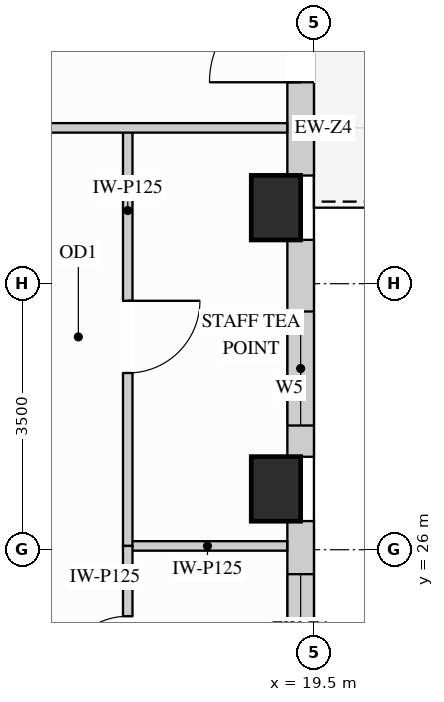
"""IFC4 building model, lengths in metres.
Left out: names, types, materials, properties, quantities, classifications, styles, units other than length and angle.
Written with IfcOpenShell. Run it as: python <this file> out.ifc"""

import sys

from ifc_helpers import new_model, si_unit, direction, frame, frame_2d, origin, origin_2d, place, context, subcontext, project, spatial, rectangle, extrude, source, transform, mapped, element, fill, save


model = new_model("IFC4")
c1 = context("Model", 3, precision=1e-05, world=origin(), true_north=direction((0.0, 1.0)))
c2 = subcontext(c1, "Body", "Model", "MODEL_VIEW")
j1 = project(units=[si_unit("LENGTHUNIT", "METRE"), si_unit("PLANEANGLEUNIT", "RADIAN")], contexts=[c1])
p1 = place(None, origin())
s1 = spatial("IfcSite", under=j1, at=p1, CompositionType="ELEMENT")
p2 = place(p1, origin())
s2 = spatial("IfcBuilding", under=s1, at=p2, CompositionType="ELEMENT")
p3 = place(p2, frame((0.0, 0.0, 223.2)))
s3 = spatial("IfcBuildingStorey", under=s2, at=p3, CompositionType="ELEMENT", Elevation=223.2)
m1 = source(origin(), c2, "Body", "SweptSolid", [
    extrude(rectangle(XDim=0.65, YDim=0.85, at=origin_2d()), origin(), (0.0, 0.0, 1.0), 3.4),
])
for number, where, z_axis, x_axis in (
    (1, (19.0, 26.8, 0.0), (0.0, 0.0, 1.0), (1.0, 0.0, 0.0)),
    (2, (19.0, 30.5, 0.0), (0.0, 0.0, 1.0), (1.0, 0.0, 0.0)),
):
    element("IfcColumn", number, at=place(p3, frame(where, z_axis=z_axis, x_axis=x_axis)), inside=s3, PredefinedType="COLUMN", context=c2, shape_type="MappedRepresentation", body=[
        mapped(m1, transform((0.0, 0.0, 0.0), x_axis=(1.0, 0.0, 0.0), y_axis=(0.0, 1.0, 0.0), z_axis=(0.0, 0.0, 1.0))),
    ])
p4 = place(p3, frame((19.325, 22.923, 0.0), z_axis=(0.0, 0.0, 1.0), x_axis=(0.0, 1.0, 0.0)))
e3 = element("IfcWall", 3, at=p4, inside=s3, PredefinedType="SOLIDWALL", context=c2, shape_type="SweptSolid", body=[
    extrude(rectangle(XDim=3.454, YDim=0.35, at=frame_2d((1.727, 0.0))), origin(), (0.0, 0.0, 1.0), 2.619),
])
p5 = place(p4, frame((1.256, 0.0, 0.78)))
e4 = element("IfcOpeningElement", 4, at=p5, cuts=e3, PredefinedType="OPENING", context=c2, shape_type="SweptSolid", body=[
    extrude(rectangle(XDim=1.5, YDim=1.659, at=frame_2d((0.75, 0.83))), frame((0.0, 0.185, 0.0), z_axis=(0.0, -1.0, 0.0), x_axis=(1.0, 0.0, 0.0)), (0.0, 0.0, 1.0), 0.37),
])
p6 = place(p3, frame((19.325, 27.223, 0.0), z_axis=(0.0, 0.0, 1.0), x_axis=(0.0, 1.0, 0.0)))
e5 = element("IfcWall", 5, at=p6, inside=s3, PredefinedType="SOLIDWALL", context=c2, shape_type="SweptSolid", body=[
    extrude(rectangle(XDim=2.854, YDim=0.35, at=frame_2d((1.427, 0.0))), origin(), (0.0, 0.0, 1.0), 2.619),
])
p7 = place(p6, frame((0.411, 0.0, 0.78)))
e6 = element("IfcOpeningElement", 6, at=p7, cuts=e5, PredefinedType="OPENING", context=c2, shape_type="SweptSolid", body=[
    extrude(rectangle(XDim=1.5, YDim=1.659, at=frame_2d((0.75, 0.83))), frame((0.0, 0.185, 0.0), z_axis=(0.0, -1.0, 0.0), x_axis=(1.0, 0.0, 0.0)), (0.0, 0.0, 1.0), 0.37),
])
p8 = place(p3, frame((19.325, 30.923, 0.0), z_axis=(0.0, 0.0, 1.0), x_axis=(0.0, 1.0, 0.0)))
e7 = element("IfcWall", 7, at=p8, inside=s3, PredefinedType="SOLIDWALL", context=c2, shape_type="SweptSolid", body=[
    extrude(rectangle(XDim=3.654, YDim=0.35, at=frame_2d((1.827, 0.0))), origin(), (0.0, 0.0, 1.0), 2.619),
])
p9 = place(p8, frame((1.227, 0.0, 0.0)))
e8 = element("IfcOpeningElement", 8, at=p9, cuts=e7, PredefinedType="OPENING", context=c2, shape_type="SweptSolid", body=[
    extrude(rectangle(XDim=1.2, YDim=2.15, at=frame_2d((0.6, 1.075))), frame((0.0, 0.185, 0.0), z_axis=(0.0, -1.0, 0.0), x_axis=(1.0, 0.0, 0.0)), (0.0, 0.0, 1.0), 0.37),
])
m2 = source(origin(), c2, "Body", "SweptSolid", [
    extrude(rectangle(XDim=2.098, YDim=0.125, at=frame_2d((1.049, 0.0))), origin(), (0.0, 0.0, 1.0), 3.385),
])
p10 = place(p3, frame((17.05, 26.05, 0.0), z_axis=(0.0, 0.0, 1.0), x_axis=(1.0, 0.0, 0.0)))
e9 = element("IfcWall", 9, at=p10, inside=s3, PredefinedType="PARTITIONING", context=c2, shape_type="MappedRepresentation", body=[
    mapped(m2, transform((0.0, 0.0, 0.0), x_axis=(1.0, 0.0, 0.0), y_axis=(0.0, 1.0, 0.0), z_axis=(0.0, 0.0, 1.0))),
])
p11 = place(p3, frame((17.05, 26.05, 0.0), z_axis=(0.0, 0.0, 1.0), x_axis=(0.0, 1.0, 0.0)))
e10 = element("IfcWall", 10, at=p11, inside=s3, PredefinedType="PARTITIONING", context=c2, shape_type="SweptSolid", body=[
    extrude(rectangle(XDim=5.5, YDim=0.125, at=frame_2d((2.75, 0.0))), origin(), (0.0, 0.0, 1.0), 3.385),
])
p12 = place(p11, frame((2.275, 0.0, 0.0)))
e11 = element("IfcOpeningElement", 11, at=p12, cuts=e10, PredefinedType="OPENING", context=c2, shape_type="SweptSolid", body=[
    extrude(rectangle(XDim=0.95, YDim=2.15, at=frame_2d((0.475, 1.075))), frame((0.0, 0.073, 0.0), z_axis=(0.0, -1.0, 0.0), x_axis=(1.0, 0.0, 0.0)), (0.0, 0.0, 1.0), 0.145),
])
p13 = place(p3, frame((17.05, 23.35, 0.0), z_axis=(0.0, 0.0, 1.0), x_axis=(0.0, 1.0, 0.0)))
e12 = element("IfcWall", 12, at=p13, inside=s3, PredefinedType="PARTITIONING", context=c2, shape_type="SweptSolid", body=[
    extrude(rectangle(XDim=2.7, YDim=0.125, at=frame_2d((1.35, 0.0))), origin(), (0.0, 0.0, 1.0), 3.385),
])
p14 = place(p13, frame((0.875, 0.0, 0.0)))
e13 = element("IfcOpeningElement", 13, at=p14, cuts=e12, PredefinedType="OPENING", context=c2, shape_type="SweptSolid", body=[
    extrude(rectangle(XDim=0.9, YDim=2.15, at=frame_2d((0.45, 1.075))), frame((0.0, 0.073, 0.0), z_axis=(0.0, -1.0, 0.0), x_axis=(1.0, 0.0, 0.0)), (0.0, 0.0, 1.0), 0.145),
])
m3 = source(origin(), c2, "Body", "SweptSolid", [
    extrude(rectangle(XDim=5.798, YDim=0.125, at=frame_2d((2.899, 0.0))), origin(), (0.0, 0.0, 1.0), 3.385),
])
p15 = place(p3, frame((13.35, 31.55, 0.0), z_axis=(0.0, 0.0, 1.0), x_axis=(1.0, 0.0, 0.0)))
e14 = element("IfcWall", 14, at=p15, inside=s3, PredefinedType="PARTITIONING", context=c2, shape_type="MappedRepresentation", body=[
    mapped(m3, transform((0.0, 0.0, 0.0), x_axis=(1.0, 0.0, 0.0), y_axis=(0.0, 1.0, 0.0), z_axis=(0.0, 0.0, 1.0))),
])
m4 = source(origin(), c2, "Body", "SweptSolid", [
    extrude(rectangle(XDim=1.2, YDim=2.15, at=frame_2d((0.6, 1.075))), frame((0.0, 0.025, 0.0), z_axis=(0.0, -1.0, 0.0), x_axis=(1.0, 0.0, 0.0)), (0.0, 0.0, 1.0), 0.05),
])
p16 = place(p9, frame((1.2, 0.0, 0.0), z_axis=(0.0, 0.0, 1.0), x_axis=(-1.0, 0.0, 0.0)))
e15 = element("IfcDoor", 15, at=p16, inside=s3, OperationType="SINGLE_SWING_LEFT", PredefinedType="DOOR", context=c2, shape_type="MappedRepresentation", body=[
    mapped(m4, transform((0.0, 0.0, 0.0), x_axis=(1.0, 0.0, 0.0), y_axis=(0.0, 1.0, 0.0), z_axis=(0.0, 0.0, 1.0))),
])
fill(e8, e15)
m5 = source(origin(), c2, "Body", "SweptSolid", [
    extrude(rectangle(XDim=0.95, YDim=2.15, at=frame_2d((0.475, 1.075))), frame((0.0, 0.025, 0.0), z_axis=(0.0, -1.0, 0.0), x_axis=(1.0, 0.0, 0.0)), (0.0, 0.0, 1.0), 0.05),
])
p17 = place(p12, origin())
e16 = element("IfcDoor", 16, at=p17, inside=s3, OperationType="SINGLE_SWING_RIGHT", PredefinedType="DOOR", context=c2, shape_type="MappedRepresentation", body=[
    mapped(m5, transform((0.0, 0.0, 0.0), x_axis=(1.0, 0.0, 0.0), y_axis=(0.0, 1.0, 0.0), z_axis=(0.0, 0.0, 1.0))),
])
fill(e11, e16)
m6 = source(origin(), c2, "Body", "SweptSolid", [
    extrude(rectangle(XDim=0.9, YDim=2.15, at=frame_2d((0.45, 1.075))), frame((0.0, 0.025, 0.0), z_axis=(0.0, -1.0, 0.0), x_axis=(1.0, 0.0, 0.0)), (0.0, 0.0, 1.0), 0.05),
])
p18 = place(p14, origin())
e17 = element("IfcDoor", 17, at=p18, inside=s3, OperationType="SINGLE_SWING_LEFT", PredefinedType="DOOR", context=c2, shape_type="MappedRepresentation", body=[
    mapped(m6, transform((0.0, 0.0, 0.0), x_axis=(1.0, 0.0, 0.0), y_axis=(0.0, 1.0, 0.0), z_axis=(0.0, 0.0, 1.0))),
])
fill(e13, e17)
m7 = source(origin(), c2, "Body", "SweptSolid", [
    extrude(rectangle(XDim=1.5, YDim=1.659, at=frame_2d((0.75, 0.83))), frame((0.0, 0.03, 0.0), z_axis=(0.0, -1.0, 0.0), x_axis=(1.0, 0.0, 0.0)), (0.0, 0.0, 1.0), 0.06),
])
p19 = place(p5, origin())
e18 = element("IfcWindow", 18, at=p19, inside=s3, PartitioningType="SINGLE_PANEL", PredefinedType="WINDOW", context=c2, shape_type="MappedRepresentation", body=[
    mapped(m7, transform((0.0, 0.0, 0.0), x_axis=(1.0, 0.0, 0.0), y_axis=(0.0, 1.0, 0.0), z_axis=(0.0, 0.0, 1.0))),
])
fill(e4, e18)
p20 = place(p7, origin())
e19 = element("IfcWindow", 19, at=p20, inside=s3, PartitioningType="SINGLE_PANEL", PredefinedType="WINDOW", context=c2, shape_type="MappedRepresentation", body=[
    mapped(m7, transform((0.0, 0.0, 0.0), x_axis=(1.0, 0.0, 0.0), y_axis=(0.0, 1.0, 0.0), z_axis=(0.0, 0.0, 1.0))),
])
fill(e6, e19)
save(model, sys.argv[1])
